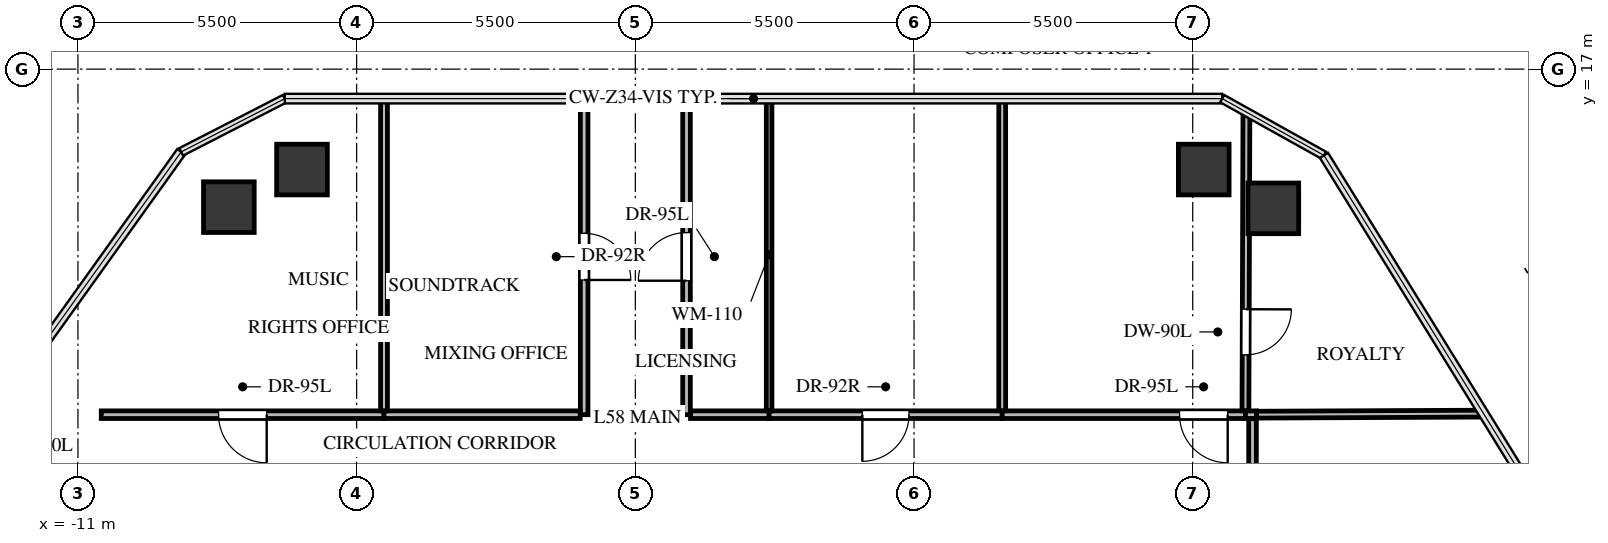
"""IFC4 building model, lengths in metres.
Left out: names, types, materials, properties, quantities, classifications, styles, units other than length and angle.
Written with IfcOpenShell. Run it as: python <this file> out.ifc"""

import sys

from ifc_helpers import new_model, si_unit, direction, frame, frame_2d, origin, origin_2d, place, context, subcontext, project, spatial, rectangle, extrude, source, transform, mapped, element, fill, save


model = new_model("IFC4")
c1 = context("Model", 3, precision=1e-05, world=origin(), true_north=direction((0.0, 1.0)))
c2 = subcontext(c1, "Body", "Model", "MODEL_VIEW")
j1 = project(units=[si_unit("LENGTHUNIT", "METRE"), si_unit("PLANEANGLEUNIT", "RADIAN")], contexts=[c1])
p1 = place(None, origin())
s1 = spatial("IfcSite", under=j1, at=p1, CompositionType="ELEMENT")
p2 = place(p1, origin())
s2 = spatial("IfcBuilding", under=s1, at=p2, CompositionType="ELEMENT")
p3 = place(p2, frame((0.0, 0.0, 209.2)))
s3 = spatial("IfcBuildingStorey", under=s2, at=p3, CompositionType="ELEMENT", Elevation=209.2)
m1 = source(origin(), c2, "Body", "SweptSolid", [
    extrude(rectangle(XDim=1.0, YDim=1.0, at=origin_2d()), origin(), (0.0, 0.0, 1.0), 4.14),
])
for number, where, z_axis, x_axis in (
    (1, (-8.022, 14.276, -0.24), (0.0, 0.0, 1.0), (1.0, 0.0, 0.0)),
    (2, (-6.579, 15.018, -0.24), (0.0, 0.0, 1.0), (1.0, 0.0, 0.0)),
    (3, (11.218, 15.018, -0.24), (0.0, 0.0, 1.0), (1.0, 0.0, 0.0)),
    (4, (12.591, 14.252, -0.24), (0.0, 0.0, 1.0), (1.0, 0.0, 0.0)),
):
    element("IfcColumn", number, at=place(p3, frame(where, z_axis=z_axis, x_axis=x_axis)), inside=s3, PredefinedType="COLUMN", context=c2, shape_type="MappedRepresentation", body=[
        mapped(m1, transform((0.0, 0.0, 0.0), x_axis=(1.0, 0.0, 0.0), y_axis=(0.0, 1.0, 0.0), z_axis=(0.0, 0.0, 1.0), scale=1.0)),
    ])
p4 = place(p3, frame((-4.96, 10.18, 0.0), z_axis=(0.0, 0.0, 1.0), x_axis=(-1.0, 0.0, 0.0)))
e5 = element("IfcWall", 5, at=p4, inside=s3, PredefinedType="PARTITIONING", context=c2, shape_type="SweptSolid", body=[
    extrude(rectangle(XDim=5.58, YDim=0.15, at=frame_2d((2.79, 0.0))), origin(), (0.0, 0.0, 1.0), 2.47),
])
p5 = place(p4, frame((2.315, 0.0, 0.0)))
e6 = element("IfcOpeningElement", 6, at=p5, cuts=e5, PredefinedType="OPENING", context=c2, shape_type="SweptSolid", body=[
    extrude(rectangle(XDim=0.95, YDim=2.1, at=frame_2d((0.475, 1.05))), frame((0.0, 0.085, 0.0), z_axis=(0.0, -1.0, 0.0), x_axis=(1.0, 0.0, 0.0)), (0.0, 0.0, 1.0), 0.17),
])
p6 = place(p3, frame((-1.01, 16.418, 0.0), z_axis=(0.0, 0.0, 1.0), x_axis=(0.0, -1.0, 0.0)))
e7 = element("IfcWall", 7, at=p6, inside=s3, PredefinedType="PARTITIONING", context=c2, shape_type="SweptSolid", body=[
    extrude(rectangle(XDim=6.238, YDim=0.15, at=frame_2d((3.119, 0.0))), origin(), (0.0, 0.0, 1.0), 2.47),
])
p7 = place(p6, frame((2.659, 0.0, 0.0)))
e8 = element("IfcOpeningElement", 8, at=p7, cuts=e7, PredefinedType="OPENING", context=c2, shape_type="SweptSolid", body=[
    extrude(rectangle(XDim=0.92, YDim=2.1, at=frame_2d((0.46, 1.05))), frame((0.0, 0.085, 0.0), z_axis=(0.0, -1.0, 0.0), x_axis=(1.0, 0.0, 0.0)), (0.0, 0.0, 1.0), 0.17),
])
p8 = place(p3, frame((-1.089, 10.18, 0.0), z_axis=(0.0, 0.0, 1.0), x_axis=(-1.0, 0.0, 0.0)))
e9 = element("IfcWall", 9, at=p8, inside=s3, PredefinedType="PARTITIONING", context=c2, shape_type="SweptSolid", body=[
    extrude(rectangle(XDim=3.871, YDim=0.15, at=frame_2d((1.936, 0.0))), origin(), (0.0, 0.0, 1.0), 3.885),
])
p9 = place(p3, frame((1.01, 10.18, 0.0), z_axis=(0.0, 0.0, 1.0), x_axis=(0.0, 1.0, 0.0)))
e10 = element("IfcWall", 10, at=p9, inside=s3, PredefinedType="PARTITIONING", context=c2, shape_type="SweptSolid", body=[
    extrude(rectangle(XDim=6.238, YDim=0.15, at=frame_2d((3.119, 0.0))), origin(), (0.0, 0.0, 1.0), 2.47),
])
p10 = place(p9, frame((2.644, 0.0, 0.0)))
e11 = element("IfcOpeningElement", 11, at=p10, cuts=e10, PredefinedType="OPENING", context=c2, shape_type="SweptSolid", body=[
    extrude(rectangle(XDim=0.95, YDim=2.1, at=frame_2d((0.475, 1.05))), frame((0.0, 0.085, 0.0), z_axis=(0.0, -1.0, 0.0), x_axis=(1.0, 0.0, 0.0)), (0.0, 0.0, 1.0), 0.17),
])
p11 = place(p3, frame((2.64, 10.18, 0.0), z_axis=(0.0, 0.0, 1.0), x_axis=(-1.0, 0.0, 0.0)))
e12 = element("IfcWall", 12, at=p11, inside=s3, PredefinedType="PARTITIONING", context=c2, shape_type="SweptSolid", body=[
    extrude(rectangle(XDim=1.551, YDim=0.15, at=frame_2d((0.775, 0.0))), origin(), (0.0, 0.0, 1.0), 3.885),
])
p12 = place(p3, frame((7.24, 10.18, 0.0), z_axis=(0.0, 0.0, 1.0), x_axis=(-1.0, 0.0, 0.0)))
e13 = element("IfcWall", 13, at=p12, inside=s3, PredefinedType="PARTITIONING", context=c2, shape_type="SweptSolid", body=[
    extrude(rectangle(XDim=4.6, YDim=0.15, at=frame_2d((2.3, 0.0))), origin(), (0.0, 0.0, 1.0), 2.47),
])
p13 = place(p12, frame((1.84, 0.0, 0.0)))
e14 = element("IfcOpeningElement", 14, at=p13, cuts=e13, PredefinedType="OPENING", context=c2, shape_type="SweptSolid", body=[
    extrude(rectangle(XDim=0.92, YDim=2.1, at=frame_2d((0.46, 1.05))), frame((0.0, 0.085, 0.0), z_axis=(0.0, -1.0, 0.0), x_axis=(1.0, 0.0, 0.0)), (0.0, 0.0, 1.0), 0.17),
])
p14 = place(p3, frame((12.04, 10.18, 0.0), z_axis=(0.0, 0.0, 1.0), x_axis=(-1.0, 0.0, 0.0)))
e15 = element("IfcWall", 15, at=p14, inside=s3, PredefinedType="PARTITIONING", context=c2, shape_type="SweptSolid", body=[
    extrude(rectangle(XDim=4.8, YDim=0.15, at=frame_2d((2.4, 0.0))), origin(), (0.0, 0.0, 1.0), 2.47),
])
p15 = place(p14, frame((0.35, 0.0, 0.0)))
e16 = element("IfcOpeningElement", 16, at=p15, cuts=e15, PredefinedType="OPENING", context=c2, shape_type="SweptSolid", body=[
    extrude(rectangle(XDim=0.95, YDim=2.1, at=frame_2d((0.475, 1.05))), frame((0.0, 0.085, 0.0), z_axis=(0.0, -1.0, 0.0), x_axis=(1.0, 0.0, 0.0)), (0.0, 0.0, 1.0), 0.17),
])
p16 = place(p3, frame((12.26, 10.18, 0.0), z_axis=(0.0, 0.0, 1.0), x_axis=(-1.0, 0.0, 0.0)))
e17 = element("IfcWall", 17, at=p16, inside=s3, PredefinedType="PARTITIONING", context=c2, shape_type="SweptSolid", body=[
    extrude(rectangle(XDim=0.22, YDim=0.15, at=frame_2d((0.11, 0.0))), origin(), (0.0, 0.0, 1.0), 3.885),
])
p17 = place(p3, frame((12.18, 2.49, 0.0), z_axis=(0.0, 0.0, 1.0), x_axis=(0.0, 1.0, 0.0)))
e18 = element("IfcWall", 18, at=p17, inside=s3, PredefinedType="PARTITIONING", context=c2, shape_type="SweptSolid", body=[
    extrude(rectangle(XDim=7.611, YDim=0.15, at=frame_2d((3.806, 0.0))), origin(), (0.0, 0.0, 1.0), 3.885),
])
p18 = place(p17, frame((3.331, 0.0, 0.0)))
e19 = element("IfcOpeningElement", 19, at=p18, cuts=e18, PredefinedType="OPENING", context=c2, shape_type="SweptSolid", body=[
    extrude(rectangle(XDim=0.95, YDim=2.1, at=frame_2d((0.475, 1.05))), frame((0.0, 0.085, 0.0), z_axis=(0.0, -1.0, 0.0), x_axis=(1.0, 0.0, 0.0)), (0.0, 0.0, 1.0), 0.17),
])
p19 = place(p3, frame((-4.96, 16.418, 0.0), z_axis=(0.0, 0.0, 1.0), x_axis=(0.0, -1.0, 0.0)))
e20 = element("IfcWall", 20, at=p19, inside=s3, PredefinedType="PARTITIONING", context=c2, shape_type="SweptSolid", body=[
    extrude(rectangle(XDim=6.159, YDim=0.135, at=frame_2d((3.08, 0.0))), origin(), (0.0, 0.0, 1.0), 2.47),
])
p20 = place(p3, frame((2.64, 16.418, 0.0), z_axis=(0.0, 0.0, 1.0), x_axis=(0.0, -1.0, 0.0)))
e21 = element("IfcWall", 21, at=p20, inside=s3, PredefinedType="MOVABLE", context=c2, shape_type="SweptSolid", body=[
    extrude(rectangle(XDim=6.159, YDim=0.11, at=frame_2d((3.08, 0.0))), origin(), (0.0, 0.0, 1.0), 2.47),
])
p21 = place(p3, frame((7.24, 16.418, 0.0), z_axis=(0.0, 0.0, 1.0), x_axis=(0.0, -1.0, 0.0)))
e22 = element("IfcWall", 22, at=p21, inside=s3, PredefinedType="PARTITIONING", context=c2, shape_type="SweptSolid", body=[
    extrude(rectangle(XDim=6.159, YDim=0.135, at=frame_2d((3.08, 0.0))), origin(), (0.0, 0.0, 1.0), 2.47),
])
p22 = place(p3, frame((12.06, 16.151, 0.0), z_axis=(0.0, 0.0, 1.0), x_axis=(-0.003273237074, -0.999994642945, 0.0)))
e23 = element("IfcWall", 23, at=p22, inside=s3, PredefinedType="PARTITIONING", context=c2, shape_type="SweptSolid", body=[
    extrude(rectangle(XDim=5.892, YDim=0.135, at=frame_2d((2.946, 0.0))), origin(), (0.0, 0.0, 1.0), 2.47),
])
p23 = place(p22, frame((3.89, 0.0, 0.0)))
e24 = element("IfcOpeningElement", 24, at=p23, cuts=e23, PredefinedType="OPENING", context=c2, shape_type="SweptSolid", body=[
    extrude(rectangle(XDim=0.9, YDim=2.05, at=frame_2d((0.45, 1.025))), frame((0.0, 0.078, 0.0), z_axis=(0.0, -1.0, 0.0), x_axis=(1.0, 0.0, 0.0)), (0.0, 0.0, 1.0), 0.155),
])
p24 = place(p3, frame((16.74, 10.201, 0.0), z_axis=(0.0, 0.0, 1.0), x_axis=(-0.999989522694, -0.004577608714, 0.0)))
e25 = element("IfcWall", 25, at=p24, inside=s3, PredefinedType="PARTITIONING", context=c2, shape_type="SweptSolid", body=[
    extrude(rectangle(XDim=4.48, YDim=0.135, at=frame_2d((2.24, 0.0))), origin(), (0.0, 0.0, 1.0), 2.47),
])
m2 = source(origin(), c2, "Body", "SweptSolid", [
    extrude(rectangle(XDim=0.95, YDim=2.1, at=frame_2d((0.475, 1.05))), frame((0.0, 0.025, 0.0), z_axis=(0.0, -1.0, 0.0), x_axis=(1.0, 0.0, 0.0)), (0.0, 0.0, 1.0), 0.05),
])
p25 = place(p5, origin())
e26 = element("IfcDoor", 26, at=p25, inside=s3, OperationType="SINGLE_SWING_LEFT", PredefinedType="DOOR", context=c2, shape_type="MappedRepresentation", body=[
    mapped(m2, transform((0.0, 0.0, 0.0), x_axis=(1.0, 0.0, 0.0), y_axis=(0.0, 1.0, 0.0), z_axis=(0.0, 0.0, 1.0), scale=1.0)),
])
fill(e6, e26)
m3 = source(origin(), c2, "Body", "SweptSolid", [
    extrude(rectangle(XDim=0.92, YDim=2.1, at=frame_2d((0.46, 1.05))), frame((0.0, 0.025, 0.0), z_axis=(0.0, -1.0, 0.0), x_axis=(1.0, 0.0, 0.0)), (0.0, 0.0, 1.0), 0.05),
])
p26 = place(p7, origin())
e27 = element("IfcDoor", 27, at=p26, inside=s3, OperationType="SINGLE_SWING_RIGHT", PredefinedType="DOOR", context=c2, shape_type="MappedRepresentation", body=[
    mapped(m3, transform((0.0, 0.0, 0.0), x_axis=(1.0, 0.0, 0.0), y_axis=(0.0, 1.0, 0.0), z_axis=(0.0, 0.0, 1.0), scale=1.0)),
])
fill(e8, e27)
p27 = place(p10, origin())
e28 = element("IfcDoor", 28, at=p27, inside=s3, OperationType="SINGLE_SWING_LEFT", PredefinedType="DOOR", context=c2, shape_type="MappedRepresentation", body=[
    mapped(m2, transform((0.0, 0.0, 0.0), x_axis=(1.0, 0.0, 0.0), y_axis=(0.0, 1.0, 0.0), z_axis=(0.0, 0.0, 1.0), scale=1.0)),
])
fill(e11, e28)
p28 = place(p13, origin())
e29 = element("IfcDoor", 29, at=p28, inside=s3, OperationType="SINGLE_SWING_RIGHT", PredefinedType="DOOR", context=c2, shape_type="MappedRepresentation", body=[
    mapped(m3, transform((0.0, 0.0, 0.0), x_axis=(1.0, 0.0, 0.0), y_axis=(0.0, 1.0, 0.0), z_axis=(0.0, 0.0, 1.0), scale=1.0)),
])
fill(e14, e29)
p29 = place(p15, origin())
e30 = element("IfcDoor", 30, at=p29, inside=s3, OperationType="SINGLE_SWING_LEFT", PredefinedType="DOOR", context=c2, shape_type="MappedRepresentation", body=[
    mapped(m2, transform((0.0, 0.0, 0.0), x_axis=(1.0, 0.0, 0.0), y_axis=(0.0, 1.0, 0.0), z_axis=(0.0, 0.0, 1.0), scale=1.0)),
])
fill(e16, e30)
m4 = source(origin(), c2, "Body", "SweptSolid", [
    extrude(rectangle(XDim=0.9, YDim=2.05, at=frame_2d((0.45, 1.025))), frame((0.0, 0.025, 0.0), z_axis=(0.0, -1.0, 0.0), x_axis=(1.0, 0.0, 0.0)), (0.0, 0.0, 1.0), 0.05),
])
p30 = place(p23, origin())
e31 = element("IfcDoor", 31, at=p30, inside=s3, OperationType="SINGLE_SWING_LEFT", PredefinedType="DOOR", context=c2, shape_type="MappedRepresentation", body=[
    mapped(m4, transform((0.0, 0.0, 0.0), x_axis=(1.0, 0.0, 0.0), y_axis=(0.0, 1.0, 0.0), z_axis=(0.0, 0.0, 1.0), scale=1.0)),
])
fill(e24, e31)
save(model, sys.argv[1])
